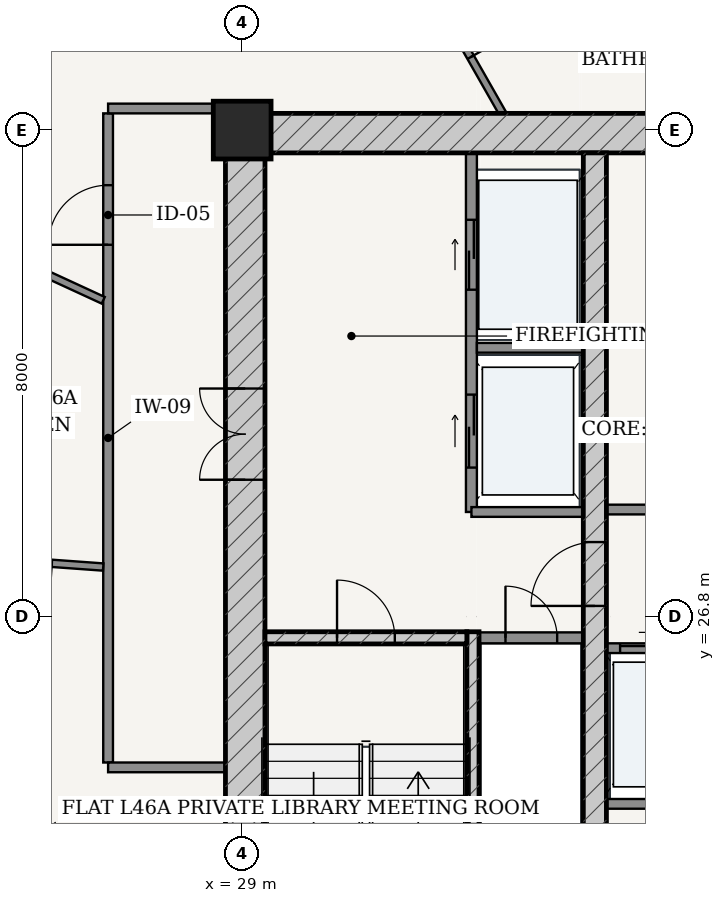
"""IFC4 building model, lengths in metres.
Left out: names, types, materials, properties, quantities, classifications, styles, units other than length and angle.
Written with IfcOpenShell. Run it as: python <this file> out.ifc"""

import sys

from ifc_helpers import new_model, si_unit, direction, frame, frame_2d, origin, origin_2d, place, context, subcontext, project, spatial, rectangle, extrude, source, transform, mapped, element, fill, save


model = new_model("IFC4")
c1 = context("Model", 3, precision=1e-05, world=origin(), true_north=direction((-0.2419218956, 0.970295726276)))
c2 = subcontext(c1, "Body", "Model", "MODEL_VIEW")
j1 = project(units=[si_unit("LENGTHUNIT", "METRE"), si_unit("PLANEANGLEUNIT", "RADIAN")], contexts=[c1])
p1 = place(None, origin())
s1 = spatial("IfcSite", under=j1, at=p1, CompositionType="ELEMENT")
p2 = place(p1, origin())
s2 = spatial("IfcBuilding", under=s1, at=p2, CompositionType="ELEMENT")
p3 = place(p2, frame((0.0, 0.0, 175.0)))
s3 = spatial("IfcBuildingStorey", under=s2, at=p3, CompositionType="ELEMENT", Elevation=175.0)
p4 = place(p3, frame((29.0, 34.8, 0.0), z_axis=(0.0, 0.0, 1.0), x_axis=(1.0, 0.0, 0.0)))
e1 = element("IfcColumn", 1, at=p4, inside=s3, PredefinedType="COLUMN", context=c2, shape_type="SweptSolid", body=[
    extrude(rectangle(XDim=0.95, YDim=0.95, at=origin_2d()), origin(), (0.0, 0.0, 1.0), 3.6),
])
p5 = place(p3, frame((28.725, 34.75, 0.0), z_axis=(0.0, 0.0, 1.0), x_axis=(1.0, 0.0, 0.0)))
e2 = element("IfcWall", 2, at=p5, inside=s3, PredefinedType="SHEAR", context=c2, shape_type="SweptSolid", body=[
    extrude(rectangle(XDim=18.55, YDim=0.65, at=frame_2d((9.275, 0.0))), origin(), (0.0, 0.0, 1.0), 3.33),
])
p6 = place(p3, frame((29.05, 19.175, 0.0), z_axis=(0.0, 0.0, 1.0), x_axis=(0.0, 1.0, 0.0)))
e3 = element("IfcWall", 3, at=p6, inside=s3, PredefinedType="SHEAR", context=c2, shape_type="SweptSolid", body=[
    extrude(rectangle(XDim=15.25, YDim=0.65, at=frame_2d((7.625, 0.0))), origin(), (0.0, 0.0, 1.0), 3.33),
])
p7 = place(p6, frame((9.875, 0.0, 0.0)))
e4 = element("IfcOpeningElement", 4, at=p7, cuts=e3, PredefinedType="OPENING", context=c2, shape_type="SweptSolid", body=[
    extrude(rectangle(XDim=1.5, YDim=2.2, at=frame_2d((0.75, 1.1))), frame((0.0, 0.335, 0.0), z_axis=(0.0, -1.0, 0.0), x_axis=(1.0, 0.0, 0.0)), (0.0, 0.0, 1.0), 0.67),
])
p8 = place(p3, frame((32.795, 19.175, 0.0), z_axis=(0.0, 0.0, 1.0), x_axis=(0.0, 1.0, 0.0)))
e5 = element("IfcWall", 5, at=p8, inside=s3, PredefinedType="SOLIDWALL", context=c2, shape_type="SweptSolid", body=[
    extrude(rectangle(XDim=7.375, YDim=0.2, at=frame_2d((3.688, 0.0))), origin(), (0.0, 0.0, 1.0), 3.33),
])
p9 = place(p3, frame((29.375, 26.45, 0.0), z_axis=(0.0, 0.0, 1.0), x_axis=(1.0, 0.0, 0.0)))
e6 = element("IfcWall", 6, at=p9, inside=s3, PredefinedType="SOLIDWALL", context=c2, shape_type="SweptSolid", body=[
    extrude(rectangle(XDim=3.32, YDim=0.2, at=frame_2d((1.66, 0.0))), origin(), (0.0, 0.0, 1.0), 3.33),
])
p10 = place(p9, frame((1.185, 0.0, 0.0)))
e7 = element("IfcOpeningElement", 7, at=p10, cuts=e6, PredefinedType="OPENING", context=c2, shape_type="SweptSolid", body=[
    extrude(rectangle(XDim=0.95, YDim=2.15, at=frame_2d((0.475, 1.075))), frame((0.0, 0.11, 0.0), z_axis=(0.0, -1.0, 0.0), x_axis=(1.0, 0.0, 0.0)), (0.0, 0.0, 1.0), 0.22),
])
p11 = place(p3, frame((34.8, 19.175, 0.0), z_axis=(0.0, 0.0, 1.0), x_axis=(0.0, 1.0, 0.0)))
e8 = element("IfcWall", 8, at=p11, inside=s3, PredefinedType="SHEAR", context=c2, shape_type="SweptSolid", body=[
    extrude(rectangle(XDim=15.25, YDim=0.38, at=frame_2d((7.625, 0.0))), origin(), (0.0, 0.0, 1.0), 3.33),
])
p12 = place(p11, frame((7.8, 0.0, 0.0)))
e9 = element("IfcOpeningElement", 9, at=p12, cuts=e8, PredefinedType="OPENING", context=c2, shape_type="SweptSolid", body=[
    extrude(rectangle(XDim=1.05, YDim=2.15, at=frame_2d((0.525, 1.075))), frame((0.0, 0.2, 0.0), z_axis=(0.0, -1.0, 0.0), x_axis=(1.0, 0.0, 0.0)), (0.0, 0.0, 1.0), 0.4),
])
p13 = place(p3, frame((32.9, 26.45, 0.0), z_axis=(0.0, 0.0, 1.0), x_axis=(1.0, 0.0, 0.0)))
e10 = element("IfcWall", 10, at=p13, inside=s3, PredefinedType="PARTITIONING", context=c2, shape_type="SweptSolid", body=[
    extrude(rectangle(XDim=1.71, YDim=0.18, at=frame_2d((0.855, 0.0))), origin(), (0.0, 0.0, 1.0), 3.33),
])
p14 = place(p13, frame((0.43, 0.0, 0.0)))
e11 = element("IfcOpeningElement", 11, at=p14, cuts=e10, PredefinedType="OPENING", context=c2, shape_type="SweptSolid", body=[
    extrude(rectangle(XDim=0.85, YDim=2.1, at=frame_2d((0.425, 1.05))), frame((0.0, 0.1, 0.0), z_axis=(0.0, -1.0, 0.0), x_axis=(1.0, 0.0, 0.0)), (0.0, 0.0, 1.0), 0.2),
])
p15 = place(p3, frame((32.77, 28.52, 0.0), z_axis=(0.0, 0.0, 1.0), x_axis=(0.0, 1.0, 0.0)))
e12 = element("IfcWall", 12, at=p15, inside=s3, PredefinedType="PARTITIONING", context=c2, shape_type="SweptSolid", body=[
    extrude(rectangle(XDim=5.905, YDim=0.18, at=frame_2d((2.953, 0.0))), origin(), (0.0, 0.0, 1.0), 3.33),
])
p16 = place(p15, frame((3.655, 0.0, 0.0)))
e13 = element("IfcOpeningElement", 13, at=p16, cuts=e12, PredefinedType="OPENING", context=c2, shape_type="SweptSolid", body=[
    extrude(rectangle(XDim=1.15, YDim=2.2, at=frame_2d((0.575, 1.1))), frame((0.0, 0.1, 0.0), z_axis=(0.0, -1.0, 0.0), x_axis=(1.0, 0.0, 0.0)), (0.0, 0.0, 1.0), 0.2),
])
p17 = place(p15, frame((0.73, 0.0, 0.0)))
e14 = element("IfcOpeningElement", 14, at=p17, cuts=e12, PredefinedType="OPENING", context=c2, shape_type="SweptSolid", body=[
    extrude(rectangle(XDim=1.2, YDim=2.25, at=frame_2d((0.6, 1.125))), frame((0.0, 0.1, 0.0), z_axis=(0.0, -1.0, 0.0), x_axis=(1.0, 0.0, 0.0)), (0.0, 0.0, 1.0), 0.2),
])
p18 = place(p3, frame((32.86, 31.22, 0.0), z_axis=(0.0, 0.0, 1.0), x_axis=(1.0, 0.0, 0.0)))
e15 = element("IfcWall", 15, at=p18, inside=s3, PredefinedType="PARTITIONING", context=c2, shape_type="SweptSolid", body=[
    extrude(rectangle(XDim=1.75, YDim=0.16, at=frame_2d((0.875, 0.0))), origin(), (0.0, 0.0, 1.0), 3.33),
])
p19 = place(p3, frame((32.77, 28.52, 0.0), z_axis=(0.0, 0.0, 1.0), x_axis=(1.0, 0.0, 0.0)))
e16 = element("IfcWall", 16, at=p19, inside=s3, PredefinedType="PARTITIONING", context=c2, shape_type="SweptSolid", body=[
    extrude(rectangle(XDim=1.84, YDim=0.16, at=frame_2d((0.92, 0.0))), origin(), (0.0, 0.0, 1.0), 3.33),
])
p20 = place(p3, frame((34.99, 28.56, 0.0), z_axis=(0.0, 0.0, 1.0), x_axis=(1.0, 0.0, 0.0)))
e17 = element("IfcWall", 17, at=p20, inside=s3, PredefinedType="PARTITIONING", context=c2, shape_type="SweptSolid", body=[
    extrude(rectangle(XDim=6.02, YDim=0.16, at=frame_2d((3.01, 0.0))), origin(), (0.0, 0.0, 1.0), 3.33),
])
p21 = place(p20, frame((1.025, 0.0, 0.0)))
e18 = element("IfcOpeningElement", 18, at=p21, cuts=e17, PredefinedType="OPENING", context=c2, shape_type="SweptSolid", body=[
    extrude(rectangle(XDim=0.86, YDim=2.1, at=frame_2d((0.43, 1.05))), frame((0.0, 0.09, 0.0), z_axis=(0.0, -1.0, 0.0), x_axis=(1.0, 0.0, 0.0)), (0.0, 0.0, 1.0), 0.18),
])
p22 = place(p20, frame((4.14, 0.0, 0.0)))
e19 = element("IfcOpeningElement", 19, at=p22, cuts=e17, PredefinedType="OPENING", context=c2, shape_type="SweptSolid", body=[
    extrude(rectangle(XDim=0.85, YDim=2.1, at=frame_2d((0.425, 1.05))), frame((0.0, 0.09, 0.0), z_axis=(0.0, -1.0, 0.0), x_axis=(1.0, 0.0, 0.0)), (0.0, 0.0, 1.0), 0.18),
])
p23 = place(p3, frame((34.99, 26.28, 0.0), z_axis=(0.0, 0.0, 1.0), x_axis=(1.0, 0.0, 0.0)))
e20 = element("IfcWall", 20, at=p23, inside=s3, PredefinedType="PARTITIONING", context=c2, shape_type="SweptSolid", body=[
    extrude(rectangle(XDim=6.02, YDim=0.16, at=frame_2d((3.01, 0.0))), origin(), (0.0, 0.0, 1.0), 3.33),
])
p24 = place(p23, frame((0.225, 0.0, 0.0)))
e21 = element("IfcOpeningElement", 21, at=p24, cuts=e20, PredefinedType="OPENING", context=c2, shape_type="SweptSolid", body=[
    extrude(rectangle(XDim=1.1, YDim=2.2, at=frame_2d((0.55, 1.1))), frame((0.0, 0.09, 0.0), z_axis=(0.0, -1.0, 0.0), x_axis=(1.0, 0.0, 0.0)), (0.0, 0.0, 1.0), 0.18),
])
p25 = place(p23, frame((1.705, 0.0, 0.0)))
e22 = element("IfcOpeningElement", 22, at=p25, cuts=e20, PredefinedType="OPENING", context=c2, shape_type="SweptSolid", body=[
    extrude(rectangle(XDim=1.1, YDim=2.2, at=frame_2d((0.55, 1.1))), frame((0.0, 0.09, 0.0), z_axis=(0.0, -1.0, 0.0), x_axis=(1.0, 0.0, 0.0)), (0.0, 0.0, 1.0), 0.18),
])
p26 = place(p3, frame((34.99, 23.72, 0.0), z_axis=(0.0, 0.0, 1.0), x_axis=(1.0, 0.0, 0.0)))
e23 = element("IfcWall", 23, at=p26, inside=s3, PredefinedType="PARTITIONING", context=c2, shape_type="SweptSolid", body=[
    extrude(rectangle(XDim=6.02, YDim=0.16, at=frame_2d((3.01, 0.0))), origin(), (0.0, 0.0, 1.0), 3.33),
])
p27 = place(p3, frame((26.795, 24.4, 0.0), z_axis=(0.0, 0.0, 1.0), x_axis=(0.0, 1.0, 0.0)))
e24 = element("IfcWall", 24, at=p27, inside=s3, PredefinedType="PARTITIONING", context=c2, shape_type="SweptSolid", body=[
    extrude(rectangle(XDim=10.675, YDim=0.16, at=frame_2d((5.337, 0.0))), origin(), (0.0, 0.0, 1.0), 2.776),
])
p28 = place(p27, frame((8.514, 0.0, 0.0)))
e25 = element("IfcOpeningElement", 25, at=p28, cuts=e24, PredefinedType="OPENING", context=c2, shape_type="SweptSolid", body=[
    extrude(rectangle(XDim=0.98, YDim=2.2, at=frame_2d((0.49, 1.1))), frame((0.0, 0.09, 0.0), z_axis=(0.0, -1.0, 0.0), x_axis=(1.0, 0.0, 0.0)), (0.0, 0.0, 1.0), 0.18),
])
p29 = place(p3, frame((26.795, 35.155, 0.0), z_axis=(0.0, 0.0, 1.0), x_axis=(1.0, 0.0, 0.0)))
e26 = element("IfcWall", 26, at=p29, inside=s3, PredefinedType="PARTITIONING", context=c2, shape_type="SweptSolid", body=[
    extrude(rectangle(XDim=1.93, YDim=0.16, at=frame_2d((0.965, 0.0))), origin(), (0.0, 0.0, 1.0), 2.776),
])
p30 = place(p3, frame((26.795, 24.32, 0.0), z_axis=(0.0, 0.0, 1.0), x_axis=(1.0, 0.0, 0.0)))
e27 = element("IfcWall", 27, at=p30, inside=s3, PredefinedType="PARTITIONING", context=c2, shape_type="SweptSolid", body=[
    extrude(rectangle(XDim=1.93, YDim=0.16, at=frame_2d((0.965, 0.0))), origin(), (0.0, 0.0, 1.0), 3.33),
])
p31 = place(p3, frame((33.283, 35.075, 0.0), z_axis=(0.0, 0.0, 1.0), x_axis=(-0.495179611311, 0.868790626412, 0.0)))
e28 = element("IfcWall", 28, at=p31, inside=s3, PredefinedType="PARTITIONING", context=c2, shape_type="SweptSolid", body=[
    extrude(rectangle(XDim=2.988, YDim=0.12, at=frame_2d((1.494, 0.0))), origin(), (0.0, 0.0, 1.0), 3.33),
])
p32 = place(p31, frame((1.064, 0.0, 0.0)))
e29 = element("IfcOpeningElement", 29, at=p32, cuts=e28, PredefinedType="OPENING", context=c2, shape_type="SweptSolid", body=[
    extrude(rectangle(XDim=0.86, YDim=2.15, at=frame_2d((0.43, 1.075))), frame((0.0, 0.07, 0.0), z_axis=(0.0, -1.0, 0.0), x_axis=(1.0, 0.0, 0.0)), (0.0, 0.0, 1.0), 0.14),
])
p33 = place(p3, frame((26.715, 32.001, 0.0), z_axis=(0.0, 0.0, 1.0), x_axis=(-0.90819942915, 0.418537688735, 0.0)))
e30 = element("IfcWall", 30, at=p33, inside=s3, PredefinedType="PARTITIONING", context=c2, shape_type="SweptSolid", body=[
    extrude(rectangle(XDim=2.856, YDim=0.12, at=frame_2d((1.428, 0.0))), origin(), (0.0, 0.0, 1.0), 3.33),
])
p34 = place(p33, frame((0.978, 0.0, 0.0)))
e31 = element("IfcOpeningElement", 31, at=p34, cuts=e30, PredefinedType="OPENING", context=c2, shape_type="SweptSolid", body=[
    extrude(rectangle(XDim=0.9, YDim=2.15, at=frame_2d((0.45, 1.075))), frame((0.0, 0.07, 0.0), z_axis=(0.0, -1.0, 0.0), x_axis=(1.0, 0.0, 0.0)), (0.0, 0.0, 1.0), 0.14),
])
p35 = place(p3, frame((26.715, 27.615, 0.0), z_axis=(0.0, 0.0, 1.0), x_axis=(-0.997406375801, 0.071975839778, 0.0)))
e32 = element("IfcWall", 32, at=p35, inside=s3, PredefinedType="PARTITIONING", context=c2, shape_type="SweptSolid", body=[
    extrude(rectangle(XDim=2.595, YDim=0.12, at=frame_2d((1.297, 0.0))), origin(), (0.0, 0.0, 1.0), 3.33),
])
p36 = place(p35, frame((0.847, 0.0, 0.0)))
e33 = element("IfcOpeningElement", 33, at=p36, cuts=e32, PredefinedType="OPENING", context=c2, shape_type="SweptSolid", body=[
    extrude(rectangle(XDim=0.9, YDim=2.15, at=frame_2d((0.45, 1.075))), frame((0.0, 0.07, 0.0), z_axis=(0.0, -1.0, 0.0), x_axis=(1.0, 0.0, 0.0)), (0.0, 0.0, 1.0), 0.14),
])
m1 = source(origin(), c2, "Body", "SweptSolid", [
    extrude(rectangle(XDim=1.5, YDim=2.2, at=frame_2d((0.75, 1.1))), frame((0.0, 0.025, 0.0), z_axis=(0.0, -1.0, 0.0), x_axis=(1.0, 0.0, 0.0)), (0.0, 0.0, 1.0), 0.05),
])
p37 = place(p7, origin())
e34 = element("IfcDoor", 34, at=p37, inside=s3, OperationType="DOUBLE_DOOR_SINGLE_SWING", PredefinedType="DOOR", context=c2, shape_type="MappedRepresentation", body=[
    mapped(m1, transform((0.0, 0.0, 0.0), scale=1.0)),
])
fill(e4, e34)
m2 = source(origin(), c2, "Body", "SweptSolid", [
    extrude(rectangle(XDim=1.05, YDim=2.15, at=frame_2d((0.525, 1.075))), frame((0.0, 0.025, 0.0), z_axis=(0.0, -1.0, 0.0), x_axis=(1.0, 0.0, 0.0)), (0.0, 0.0, 1.0), 0.05),
])
p38 = place(p12, origin())
e35 = element("IfcDoor", 35, at=p38, inside=s3, OperationType="SINGLE_SWING_LEFT", PredefinedType="DOOR", context=c2, shape_type="MappedRepresentation", body=[
    mapped(m2, transform((0.0, 0.0, 0.0), scale=1.0)),
])
fill(e9, e35)
m3 = source(origin(), c2, "Body", "SweptSolid", [
    extrude(rectangle(XDim=0.95, YDim=2.15, at=frame_2d((0.475, 1.075))), frame((0.0, 0.025, 0.0), z_axis=(0.0, -1.0, 0.0), x_axis=(1.0, 0.0, 0.0)), (0.0, 0.0, 1.0), 0.05),
])
p39 = place(p10, origin())
e36 = element("IfcDoor", 36, at=p39, inside=s3, OperationType="SINGLE_SWING_LEFT", PredefinedType="DOOR", context=c2, shape_type="MappedRepresentation", body=[
    mapped(m3, transform((0.0, 0.0, 0.0), scale=1.0)),
])
fill(e7, e36)
m4 = source(origin(), c2, "Body", "SweptSolid", [
    extrude(rectangle(XDim=0.85, YDim=2.1, at=frame_2d((0.425, 1.05))), frame((0.0, 0.025, 0.0), z_axis=(0.0, -1.0, 0.0), x_axis=(1.0, 0.0, 0.0)), (0.0, 0.0, 1.0), 0.05),
])
p40 = place(p14, origin())
e37 = element("IfcDoor", 37, at=p40, inside=s3, OperationType="SINGLE_SWING_LEFT", PredefinedType="DOOR", context=c2, shape_type="MappedRepresentation", body=[
    mapped(m4, transform((0.0, 0.0, 0.0), scale=1.0)),
])
fill(e11, e37)
m5 = source(origin(), c2, "Body", "SweptSolid", [
    extrude(rectangle(XDim=1.15, YDim=2.2, at=frame_2d((0.575, 1.1))), frame((0.0, 0.025, 0.0), z_axis=(0.0, -1.0, 0.0), x_axis=(1.0, 0.0, 0.0)), (0.0, 0.0, 1.0), 0.05),
])
p41 = place(p16, origin())
e38 = element("IfcDoor", 38, at=p41, inside=s3, OperationType="DOUBLE_DOOR_SLIDING", PredefinedType="DOOR", context=c2, shape_type="MappedRepresentation", body=[
    mapped(m5, transform((0.0, 0.0, 0.0), scale=1.0)),
])
fill(e13, e38)
m6 = source(origin(), c2, "Body", "SweptSolid", [
    extrude(rectangle(XDim=1.2, YDim=2.25, at=frame_2d((0.6, 1.125))), frame((0.0, 0.025, 0.0), z_axis=(0.0, -1.0, 0.0), x_axis=(1.0, 0.0, 0.0)), (0.0, 0.0, 1.0), 0.05),
])
p42 = place(p17, origin())
e39 = element("IfcDoor", 39, at=p42, inside=s3, OperationType="DOUBLE_DOOR_SLIDING", PredefinedType="DOOR", context=c2, shape_type="MappedRepresentation", body=[
    mapped(m6, transform((0.0, 0.0, 0.0), scale=1.0)),
])
fill(e14, e39)
m7 = source(origin(), c2, "Body", "SweptSolid", [
    extrude(rectangle(XDim=1.1, YDim=2.2, at=frame_2d((0.55, 1.1))), frame((0.0, 0.025, 0.0), z_axis=(0.0, -1.0, 0.0), x_axis=(1.0, 0.0, 0.0)), (0.0, 0.0, 1.0), 0.05),
])
p43 = place(p24, origin())
e40 = element("IfcDoor", 40, at=p43, inside=s3, OperationType="DOUBLE_DOOR_SLIDING", PredefinedType="DOOR", context=c2, shape_type="MappedRepresentation", body=[
    mapped(m7, transform((0.0, 0.0, 0.0), scale=1.0)),
])
fill(e21, e40)
m8 = source(origin(), c2, "Body", "SweptSolid", [
    extrude(rectangle(XDim=0.98, YDim=2.2, at=frame_2d((0.49, 1.1))), frame((0.0, 0.025, 0.0), z_axis=(0.0, -1.0, 0.0), x_axis=(1.0, 0.0, 0.0)), (0.0, 0.0, 1.0), 0.05),
])
p44 = place(p28, origin())
e41 = element("IfcDoor", 41, at=p44, inside=s3, OperationType="SINGLE_SWING_LEFT", PredefinedType="DOOR", context=c2, shape_type="MappedRepresentation", body=[
    mapped(m8, transform((0.0, 0.0, 0.0), scale=1.0)),
])
fill(e25, e41)
m9 = source(origin(), c2, "Body", "SweptSolid", [
    extrude(rectangle(XDim=0.86, YDim=2.15, at=frame_2d((0.43, 1.075))), frame((0.0, 0.025, 0.0), z_axis=(0.0, -1.0, 0.0), x_axis=(1.0, 0.0, 0.0)), (0.0, 0.0, 1.0), 0.05),
])
p45 = place(p32, frame((0.86, 0.0, 0.0), z_axis=(0.0, 0.0, 1.0), x_axis=(-1.0, 0.0, 0.0)))
e42 = element("IfcDoor", 42, at=p45, inside=s3, OperationType="SINGLE_SWING_RIGHT", PredefinedType="DOOR", context=c2, shape_type="MappedRepresentation", body=[
    mapped(m9, transform((0.0, 0.0, 0.0), scale=1.0)),
])
fill(e29, e42)
save(model, sys.argv[1])
